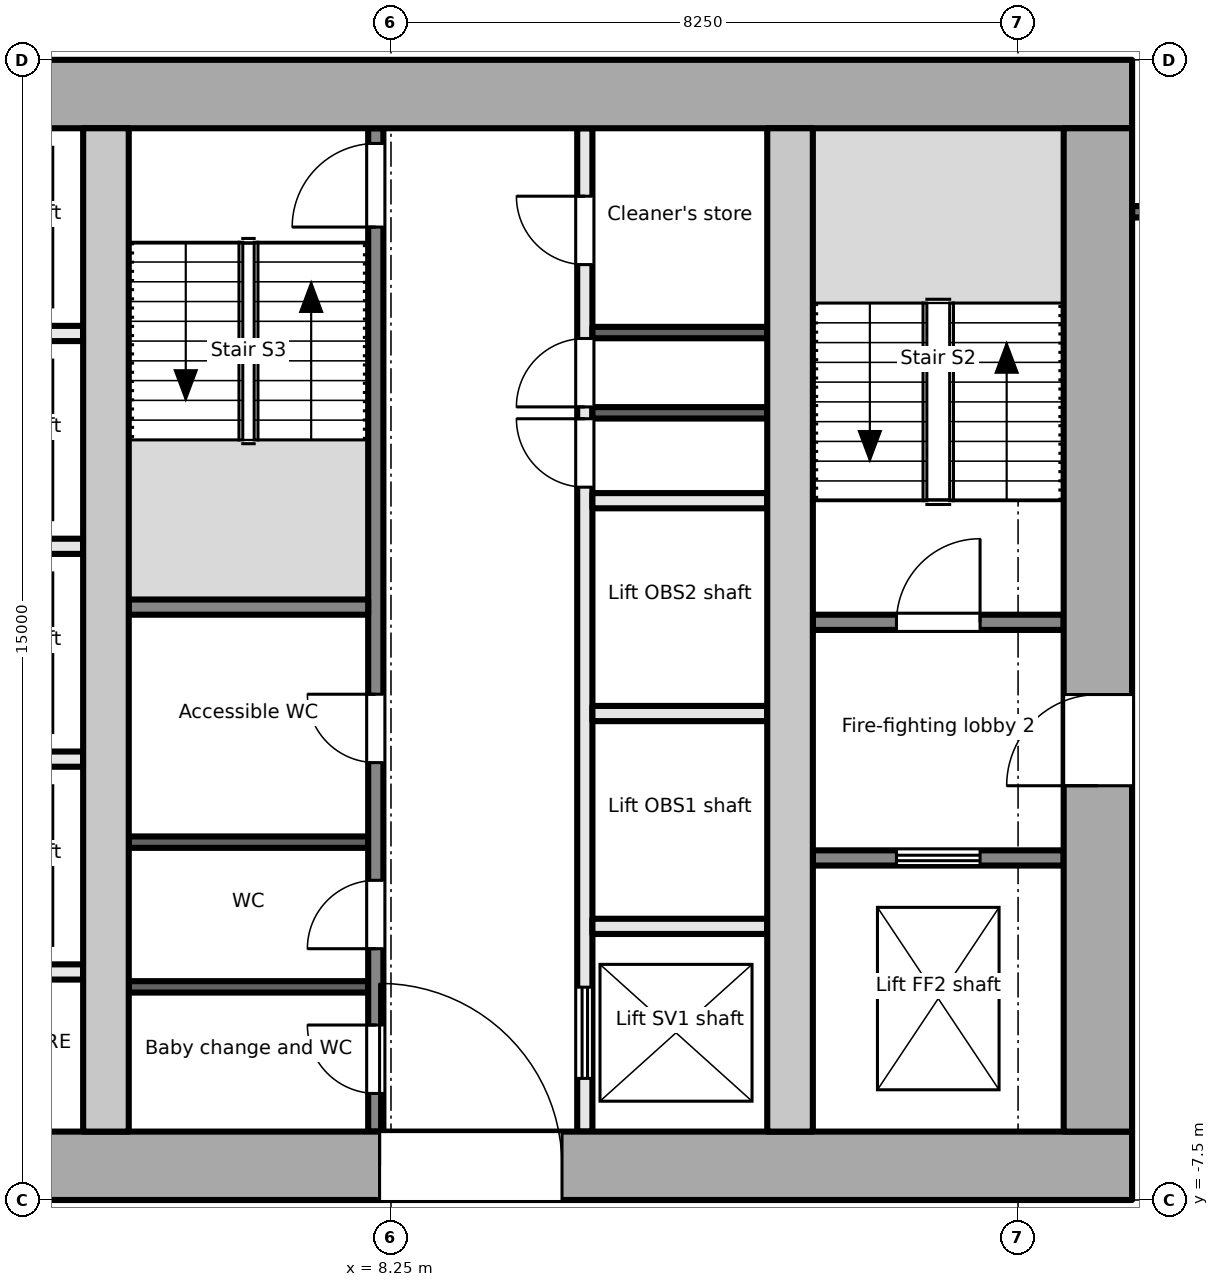
"""IFC4 building model, lengths in metres.
Left out: names, types, materials, properties, quantities, classifications, styles, units other than length and angle.
Written with IfcOpenShell. Run it as: python <this file> out.ifc"""

import sys

from ifc_helpers import new_model, si_unit, direction, frame, frame_2d, origin, place, context, subcontext, project, spatial, rectangle, extrude, element, fill, save


model = new_model("IFC4")
c1 = context("Model", 3, precision=1e-05, world=origin(), true_north=direction((0.0, 1.0)))
c2 = subcontext(c1, "Body", "Model", "MODEL_VIEW")
j1 = project(units=[si_unit("LENGTHUNIT", "METRE"), si_unit("PLANEANGLEUNIT", "RADIAN")], contexts=[c1])
p1 = place(None, origin())
s1 = spatial("IfcSite", under=j1, at=p1, CompositionType="ELEMENT")
p2 = place(p1, origin())
s2 = spatial("IfcBuilding", under=s1, at=p2, CompositionType="ELEMENT")
p3 = place(p2, frame((0.0, 0.0, 262.9)))
s3 = spatial("IfcBuildingStorey", under=s2, at=p3, CompositionType="ELEMENT", Elevation=262.9)
p4 = place(p3, frame((-18.0, -7.05, -0.2), z_axis=(0.0, 0.0, 1.0), x_axis=(1.0, 0.0, 0.0)))
e1 = element("IfcWall", 1, at=p4, inside=s3, PredefinedType="SHEAR", context=c2, shape_type="SweptSolid", body=[
    extrude(rectangle(XDim=36.0, YDim=0.9, at=frame_2d((18.0, 0.0))), origin(), (0.0, 0.0, 1.0), 3.9),
])
p5 = place(p4, frame((8.1, 0.0, 0.2)))
e2 = element("IfcOpeningElement", 2, at=p5, cuts=e1, PredefinedType="OPENING", context=c2, shape_type="SweptSolid", body=[
    extrude(rectangle(XDim=1.8, YDim=2.1, at=frame_2d((0.9, 1.05))), frame((0.0, 0.46, 0.0), z_axis=(0.0, -1.0, 0.0), x_axis=(1.0, 0.0, 0.0)), (0.0, 0.0, 1.0), 0.921),
])
p6 = place(p4, frame((16.8, 0.0, 0.2)))
e3 = element("IfcOpeningElement", 3, at=p6, cuts=e1, PredefinedType="OPENING", context=c2, shape_type="SweptSolid", body=[
    extrude(rectangle(XDim=2.4, YDim=2.1, at=frame_2d((1.2, 1.05))), frame((0.0, 0.46, 0.0), z_axis=(0.0, -1.0, 0.0), x_axis=(1.0, 0.0, 0.0)), (0.0, 0.0, 1.0), 0.921),
])
p7 = place(p4, frame((26.1, 0.0, 0.2)))
e4 = element("IfcOpeningElement", 4, at=p7, cuts=e1, PredefinedType="OPENING", context=c2, shape_type="SweptSolid", body=[
    extrude(rectangle(XDim=2.4, YDim=2.1, at=frame_2d((1.2, 1.05))), frame((0.0, 0.46, 0.0), z_axis=(0.0, -1.0, 0.0), x_axis=(1.0, 0.0, 0.0)), (0.0, 0.0, 1.0), 0.921),
])
p8 = place(p3, frame((-18.0, 7.05, -0.2), z_axis=(0.0, 0.0, 1.0), x_axis=(1.0, 0.0, 0.0)))
e5 = element("IfcWall", 5, at=p8, inside=s3, PredefinedType="SHEAR", context=c2, shape_type="SweptSolid", body=[
    extrude(rectangle(XDim=36.0, YDim=0.9, at=frame_2d((18.0, 0.0))), origin(), (0.0, 0.0, 1.0), 3.9),
])
p9 = place(p3, frame((17.55, -6.6, -0.2), z_axis=(0.0, 0.0, 1.0), x_axis=(0.0, 1.0, 0.0)))
e6 = element("IfcWall", 6, at=p9, inside=s3, PredefinedType="SHEAR", context=c2, shape_type="SweptSolid", body=[
    extrude(rectangle(XDim=13.2, YDim=0.9, at=frame_2d((6.6, 0.0))), origin(), (0.0, 0.0, 1.0), 3.9),
])
p10 = place(p9, frame((4.55, 0.0, 0.2)))
e7 = element("IfcOpeningElement", 7, at=p10, cuts=e6, PredefinedType="OPENING", context=c2, shape_type="SweptSolid", body=[
    extrude(rectangle(XDim=1.2, YDim=2.1, at=frame_2d((0.6, 1.05))), frame((0.0, 0.46, 0.0), z_axis=(0.0, -1.0, 0.0), x_axis=(1.0, 0.0, 0.0)), (0.0, 0.0, 1.0), 0.921),
])
for number, where, z_axis, x_axis in (
    (8, (4.5, -6.6, -0.2), (0.0, 0.0, 1.0), (0.0, 1.0, 0.0)),
    (9, (13.5, -6.6, -0.2), (0.0, 0.0, 1.0), (0.0, 1.0, 0.0)),
):
    element("IfcWall", number, at=place(p3, frame(where, z_axis=z_axis, x_axis=x_axis)), inside=s3, PredefinedType="SHEAR", context=c2, shape_type="SweptSolid", body=[
        extrude(rectangle(XDim=13.2, YDim=0.6, at=frame_2d((6.6, 0.0))), origin(), (0.0, 0.0, 1.0), 3.9),
    ])
p11 = place(p3, frame((13.8, -3.0, 0.0), z_axis=(0.0, 0.0, 1.0), x_axis=(1.0, 0.0, 0.0)))
e10 = element("IfcWall", 10, at=p11, inside=s3, PredefinedType="PARTITIONING", context=c2, shape_type="SweptSolid", body=[
    extrude(rectangle(XDim=3.3, YDim=0.2, at=frame_2d((1.65, 0.0))), origin(), (0.0, 0.0, 1.0), 3.7),
])
p12 = place(p11, frame((1.1, 0.0, 0.0)))
e11 = element("IfcOpeningElement", 11, at=p12, cuts=e10, PredefinedType="OPENING", context=c2, shape_type="SweptSolid", body=[
    extrude(rectangle(XDim=1.1, YDim=2.1, at=frame_2d((0.55, 1.05))), frame((0.0, 0.111, 0.0), z_axis=(0.0, -1.0, 0.0), x_axis=(1.0, 0.0, 0.0)), (0.0, 0.0, 1.0), 0.221),
])
p13 = place(p3, frame((13.8, 0.1, 0.0), z_axis=(0.0, 0.0, 1.0), x_axis=(1.0, 0.0, 0.0)))
e12 = element("IfcWall", 12, at=p13, inside=s3, PredefinedType="PARTITIONING", context=c2, shape_type="SweptSolid", body=[
    extrude(rectangle(XDim=3.3, YDim=0.2, at=frame_2d((1.65, 0.0))), origin(), (0.0, 0.0, 1.0), 3.7),
])
p14 = place(p13, frame((1.1, 0.0, 0.0)))
e13 = element("IfcOpeningElement", 13, at=p14, cuts=e12, PredefinedType="OPENING", context=c2, shape_type="SweptSolid", body=[
    extrude(rectangle(XDim=1.1, YDim=2.1, at=frame_2d((0.55, 1.05))), frame((0.0, 0.111, 0.0), z_axis=(0.0, -1.0, 0.0), x_axis=(1.0, 0.0, 0.0)), (0.0, 0.0, 1.0), 0.221),
])
for number, where, z_axis, x_axis in (
    (14, (1.9, -1.7, 0.0), (0.0, 0.0, 1.0), (1.0, 0.0, 0.0)),
    (15, (1.9, 1.1, 0.0), (0.0, 0.0, 1.0), (1.0, 0.0, 0.0)),
    (16, (1.9, 3.9, 0.0), (0.0, 0.0, 1.0), (1.0, 0.0, 0.0)),
    (17, (1.9, -4.5, 0.0), (0.0, 0.0, 1.0), (1.0, 0.0, 0.0)),
):
    element("IfcWall", number, at=place(p3, frame(where, z_axis=z_axis, x_axis=x_axis)), inside=s3, PredefinedType="PARTITIONING", context=c2, shape_type="SweptSolid", body=[
        extrude(rectangle(XDim=2.3, YDim=0.2, at=frame_2d((1.15, 0.0))), origin(), (0.0, 0.0, 1.0), 3.7),
    ])
p15 = place(p3, frame((8.05, -6.6, 0.0), z_axis=(0.0, 0.0, 1.0), x_axis=(0.0, 1.0, 0.0)))
e18 = element("IfcWall", 18, at=p15, inside=s3, PredefinedType="PARTITIONING", context=c2, shape_type="SweptSolid", body=[
    extrude(rectangle(XDim=13.2, YDim=0.2, at=frame_2d((6.6, 0.0))), origin(), (0.0, 0.0, 1.0), 3.7),
])
p16 = place(p15, frame((0.502, 0.0, 0.0)))
e19 = element("IfcOpeningElement", 19, at=p16, cuts=e18, PredefinedType="OPENING", context=c2, shape_type="SweptSolid", body=[
    extrude(rectangle(XDim=0.9, YDim=2.1, at=frame_2d((0.45, 1.05))), frame((0.0, 0.111, 0.0), z_axis=(0.0, -1.0, 0.0), x_axis=(1.0, 0.0, 0.0)), (0.0, 0.0, 1.0), 0.221),
])
p17 = place(p15, frame((2.406, 0.0, 0.0)))
e20 = element("IfcOpeningElement", 20, at=p17, cuts=e18, PredefinedType="OPENING", context=c2, shape_type="SweptSolid", body=[
    extrude(rectangle(XDim=0.9, YDim=2.1, at=frame_2d((0.45, 1.05))), frame((0.0, 0.111, 0.0), z_axis=(0.0, -1.0, 0.0), x_axis=(1.0, 0.0, 0.0)), (0.0, 0.0, 1.0), 0.221),
])
p18 = place(p15, frame((4.854, 0.0, 0.0)))
e21 = element("IfcOpeningElement", 21, at=p18, cuts=e18, PredefinedType="OPENING", context=c2, shape_type="SweptSolid", body=[
    extrude(rectangle(XDim=0.9, YDim=2.1, at=frame_2d((0.45, 1.05))), frame((0.0, 0.111, 0.0), z_axis=(0.0, -1.0, 0.0), x_axis=(1.0, 0.0, 0.0)), (0.0, 0.0, 1.0), 0.221),
])
p19 = place(p15, frame((11.9, 0.0, 0.0)))
e22 = element("IfcOpeningElement", 22, at=p19, cuts=e18, PredefinedType="OPENING", context=c2, shape_type="SweptSolid", body=[
    extrude(rectangle(XDim=1.1, YDim=2.1, at=frame_2d((0.55, 1.05))), frame((0.0, 0.111, 0.0), z_axis=(0.0, -1.0, 0.0), x_axis=(1.0, 0.0, 0.0)), (0.0, 0.0, 1.0), 0.221),
])
p20 = place(p3, frame((10.8, -6.6, 0.0), z_axis=(0.0, 0.0, 1.0), x_axis=(0.0, 1.0, 0.0)))
e23 = element("IfcWall", 23, at=p20, inside=s3, PredefinedType="PARTITIONING", context=c2, shape_type="SweptSolid", body=[
    extrude(rectangle(XDim=13.2, YDim=0.2, at=frame_2d((6.6, 0.0))), origin(), (0.0, 0.0, 1.0), 3.7),
])
p21 = place(p20, frame((0.7, 0.0, 0.0)))
e24 = element("IfcOpeningElement", 24, at=p21, cuts=e23, PredefinedType="OPENING", context=c2, shape_type="SweptSolid", body=[
    extrude(rectangle(XDim=1.2, YDim=2.1, at=frame_2d((0.6, 1.05))), frame((0.0, 0.111, 0.0), z_axis=(0.0, -1.0, 0.0), x_axis=(1.0, 0.0, 0.0)), (0.0, 0.0, 1.0), 0.221),
])
p22 = place(p20, frame((8.478, 0.0, 0.0)))
e25 = element("IfcOpeningElement", 25, at=p22, cuts=e23, PredefinedType="OPENING", context=c2, shape_type="SweptSolid", body=[
    extrude(rectangle(XDim=0.9, YDim=2.1, at=frame_2d((0.45, 1.05))), frame((0.0, 0.111, 0.0), z_axis=(0.0, -1.0, 0.0), x_axis=(1.0, 0.0, 0.0)), (0.0, 0.0, 1.0), 0.221),
])
p23 = place(p20, frame((9.534, 0.0, 0.0)))
e26 = element("IfcOpeningElement", 26, at=p23, cuts=e23, PredefinedType="OPENING", context=c2, shape_type="SweptSolid", body=[
    extrude(rectangle(XDim=0.9, YDim=2.1, at=frame_2d((0.45, 1.05))), frame((0.0, 0.111, 0.0), z_axis=(0.0, -1.0, 0.0), x_axis=(1.0, 0.0, 0.0)), (0.0, 0.0, 1.0), 0.221),
])
p24 = place(p20, frame((11.406, 0.0, 0.0)))
e27 = element("IfcOpeningElement", 27, at=p24, cuts=e23, PredefinedType="OPENING", context=c2, shape_type="SweptSolid", body=[
    extrude(rectangle(XDim=0.9, YDim=2.1, at=frame_2d((0.45, 1.05))), frame((0.0, 0.111, 0.0), z_axis=(0.0, -1.0, 0.0), x_axis=(1.0, 0.0, 0.0)), (0.0, 0.0, 1.0), 0.221),
])
p25 = place(p3, frame((4.8, 0.3, 0.0), z_axis=(0.0, 0.0, 1.0), x_axis=(1.0, 0.0, 0.0)))
e28 = element("IfcWall", 28, at=p25, inside=s3, PredefinedType="PARTITIONING", context=c2, shape_type="SweptSolid", body=[
    extrude(rectangle(XDim=3.15, YDim=0.2, at=frame_2d((1.575, 0.0))), origin(), (0.0, 0.0, 1.0), 3.7),
])
for number, where, z_axis, x_axis in (
    (29, (4.8, -4.696, 0.0), (0.0, 0.0, 1.0), (1.0, 0.0, 0.0)),
    (30, (4.8, -2.792, 0.0), (0.0, 0.0, 1.0), (1.0, 0.0, 0.0)),
):
    element("IfcWall", number, at=place(p3, frame(where, z_axis=z_axis, x_axis=x_axis)), inside=s3, PredefinedType="PARTITIONING", context=c2, shape_type="SweptSolid", body=[
        extrude(rectangle(XDim=3.15, YDim=0.15, at=frame_2d((1.575, 0.0))), origin(), (0.0, 0.0, 1.0), 3.7),
    ])
for number, where, z_axis, x_axis in (
    (31, (10.9, -3.9, 0.0), (0.0, 0.0, 1.0), (1.0, 0.0, 0.0)),
    (32, (10.9, -1.1, 0.0), (0.0, 0.0, 1.0), (1.0, 0.0, 0.0)),
    (33, (10.9, 1.7, 0.0), (0.0, 0.0, 1.0), (1.0, 0.0, 0.0)),
):
    element("IfcWall", number, at=place(p3, frame(where, z_axis=z_axis, x_axis=x_axis)), inside=s3, PredefinedType="PARTITIONING", context=c2, shape_type="SweptSolid", body=[
        extrude(rectangle(XDim=2.3, YDim=0.2, at=frame_2d((1.15, 0.0))), origin(), (0.0, 0.0, 1.0), 3.7),
    ])
for number, where, z_axis, x_axis in (
    (34, (10.9, 2.856, 0.0), (0.0, 0.0, 1.0), (1.0, 0.0, 0.0)),
    (35, (10.9, 3.912, 0.0), (0.0, 0.0, 1.0), (1.0, 0.0, 0.0)),
):
    element("IfcWall", number, at=place(p3, frame(where, z_axis=z_axis, x_axis=x_axis)), inside=s3, PredefinedType="PARTITIONING", context=c2, shape_type="SweptSolid", body=[
        extrude(rectangle(XDim=2.3, YDim=0.15, at=frame_2d((1.15, 0.0))), origin(), (0.0, 0.0, 1.0), 3.7),
    ])
p26 = place(p3, frame((18.0, 5.501, 0.0), z_axis=(0.0, 0.0, 1.0), x_axis=(1.0, 0.0, 0.0)))
e36 = element("IfcWall", 36, at=p26, inside=s3, PredefinedType="PARTITIONING", context=c2, shape_type="SweptSolid", body=[
    extrude(rectangle(XDim=2.325, YDim=0.15, at=frame_2d((1.163, 0.0))), origin(), (0.0, 0.0, 1.0), 3.7),
])
p27 = place(p12, origin())
e37 = element("IfcDoor", 37, at=p27, inside=s3, OperationType="DOUBLE_DOOR_SLIDING", PredefinedType="DOOR", context=c2, shape_type="SweptSolid", body=[
    extrude(rectangle(XDim=1.1, YDim=2.1, at=frame_2d((0.55, 1.05))), frame((0.0, 0.025, 0.0), z_axis=(0.0, -1.0, 0.0), x_axis=(1.0, 0.0, 0.0)), (0.0, 0.0, 1.0), 0.05),
])
fill(e11, e37)
p28 = place(p10, origin())
e38 = element("IfcDoor", 38, at=p28, inside=s3, OperationType="SINGLE_SWING_LEFT", PredefinedType="DOOR", context=c2, shape_type="SweptSolid", body=[
    extrude(rectangle(XDim=1.2, YDim=2.1, at=frame_2d((0.6, 1.05))), frame((0.0, 0.025, 0.0), z_axis=(0.0, -1.0, 0.0), x_axis=(1.0, 0.0, 0.0)), (0.0, 0.0, 1.0), 0.05),
])
fill(e7, e38)
p29 = place(p14, origin())
e39 = element("IfcDoor", 39, at=p29, inside=s3, OperationType="SINGLE_SWING_RIGHT", PredefinedType="DOOR", context=c2, shape_type="SweptSolid", body=[
    extrude(rectangle(XDim=1.1, YDim=2.1, at=frame_2d((0.55, 1.05))), frame((0.0, 0.025, 0.0), z_axis=(0.0, -1.0, 0.0), x_axis=(1.0, 0.0, 0.0)), (0.0, 0.0, 1.0), 0.05),
])
fill(e13, e39)
p30 = place(p16, origin())
e40 = element("IfcDoor", 40, at=p30, inside=s3, OperationType="SINGLE_SWING_RIGHT", PredefinedType="DOOR", context=c2, shape_type="SweptSolid", body=[
    extrude(rectangle(XDim=0.9, YDim=2.1, at=frame_2d((0.45, 1.05))), frame((0.0, 0.025, 0.0), z_axis=(0.0, -1.0, 0.0), x_axis=(1.0, 0.0, 0.0)), (0.0, 0.0, 1.0), 0.05),
])
fill(e19, e40)
p31 = place(p17, origin())
e41 = element("IfcDoor", 41, at=p31, inside=s3, OperationType="SINGLE_SWING_LEFT", PredefinedType="DOOR", context=c2, shape_type="SweptSolid", body=[
    extrude(rectangle(XDim=0.9, YDim=2.1, at=frame_2d((0.45, 1.05))), frame((0.0, 0.025, 0.0), z_axis=(0.0, -1.0, 0.0), x_axis=(1.0, 0.0, 0.0)), (0.0, 0.0, 1.0), 0.05),
])
fill(e20, e41)
p32 = place(p18, origin())
e42 = element("IfcDoor", 42, at=p32, inside=s3, OperationType="SINGLE_SWING_RIGHT", PredefinedType="DOOR", context=c2, shape_type="SweptSolid", body=[
    extrude(rectangle(XDim=0.9, YDim=2.1, at=frame_2d((0.45, 1.05))), frame((0.0, 0.025, 0.0), z_axis=(0.0, -1.0, 0.0), x_axis=(1.0, 0.0, 0.0)), (0.0, 0.0, 1.0), 0.05),
])
fill(e21, e42)
p33 = place(p19, origin())
e43 = element("IfcDoor", 43, at=p33, inside=s3, OperationType="SINGLE_SWING_LEFT", PredefinedType="DOOR", context=c2, shape_type="SweptSolid", body=[
    extrude(rectangle(XDim=1.1, YDim=2.1, at=frame_2d((0.55, 1.05))), frame((0.0, 0.025, 0.0), z_axis=(0.0, -1.0, 0.0), x_axis=(1.0, 0.0, 0.0)), (0.0, 0.0, 1.0), 0.05),
])
fill(e22, e43)
p34 = place(p7, origin())
e44 = element("IfcDoor", 44, at=p34, inside=s3, OperationType="DOUBLE_DOOR_DOUBLE_SWING", PredefinedType="DOOR", context=c2, shape_type="SweptSolid", body=[
    extrude(rectangle(XDim=2.4, YDim=2.1, at=frame_2d((1.2, 1.05))), frame((0.0, 0.025, 0.0), z_axis=(0.0, -1.0, 0.0), x_axis=(1.0, 0.0, 0.0)), (0.0, 0.0, 1.0), 0.05),
])
fill(e4, e44)
p35 = place(p21, origin())
e45 = element("IfcDoor", 45, at=p35, inside=s3, OperationType="DOUBLE_DOOR_SLIDING", PredefinedType="DOOR", context=c2, shape_type="SweptSolid", body=[
    extrude(rectangle(XDim=1.2, YDim=2.1, at=frame_2d((0.6, 1.05))), frame((0.0, 0.025, 0.0), z_axis=(0.0, -1.0, 0.0), x_axis=(1.0, 0.0, 0.0)), (0.0, 0.0, 1.0), 0.05),
])
fill(e24, e45)
p36 = place(p22, origin())
e46 = element("IfcDoor", 46, at=p36, inside=s3, OperationType="SINGLE_SWING_RIGHT", PredefinedType="DOOR", context=c2, shape_type="SweptSolid", body=[
    extrude(rectangle(XDim=0.9, YDim=2.1, at=frame_2d((0.45, 1.05))), frame((0.0, 0.025, 0.0), z_axis=(0.0, -1.0, 0.0), x_axis=(1.0, 0.0, 0.0)), (0.0, 0.0, 1.0), 0.05),
])
fill(e25, e46)
p37 = place(p23, origin())
e47 = element("IfcDoor", 47, at=p37, inside=s3, OperationType="SINGLE_SWING_LEFT", PredefinedType="DOOR", context=c2, shape_type="SweptSolid", body=[
    extrude(rectangle(XDim=0.9, YDim=2.1, at=frame_2d((0.45, 1.05))), frame((0.0, 0.025, 0.0), z_axis=(0.0, -1.0, 0.0), x_axis=(1.0, 0.0, 0.0)), (0.0, 0.0, 1.0), 0.05),
])
fill(e26, e47)
p38 = place(p24, origin())
e48 = element("IfcDoor", 48, at=p38, inside=s3, OperationType="SINGLE_SWING_RIGHT", PredefinedType="DOOR", context=c2, shape_type="SweptSolid", body=[
    extrude(rectangle(XDim=0.9, YDim=2.1, at=frame_2d((0.45, 1.05))), frame((0.0, 0.025, 0.0), z_axis=(0.0, -1.0, 0.0), x_axis=(1.0, 0.0, 0.0)), (0.0, 0.0, 1.0), 0.05),
])
fill(e27, e48)
save(model, sys.argv[1])
